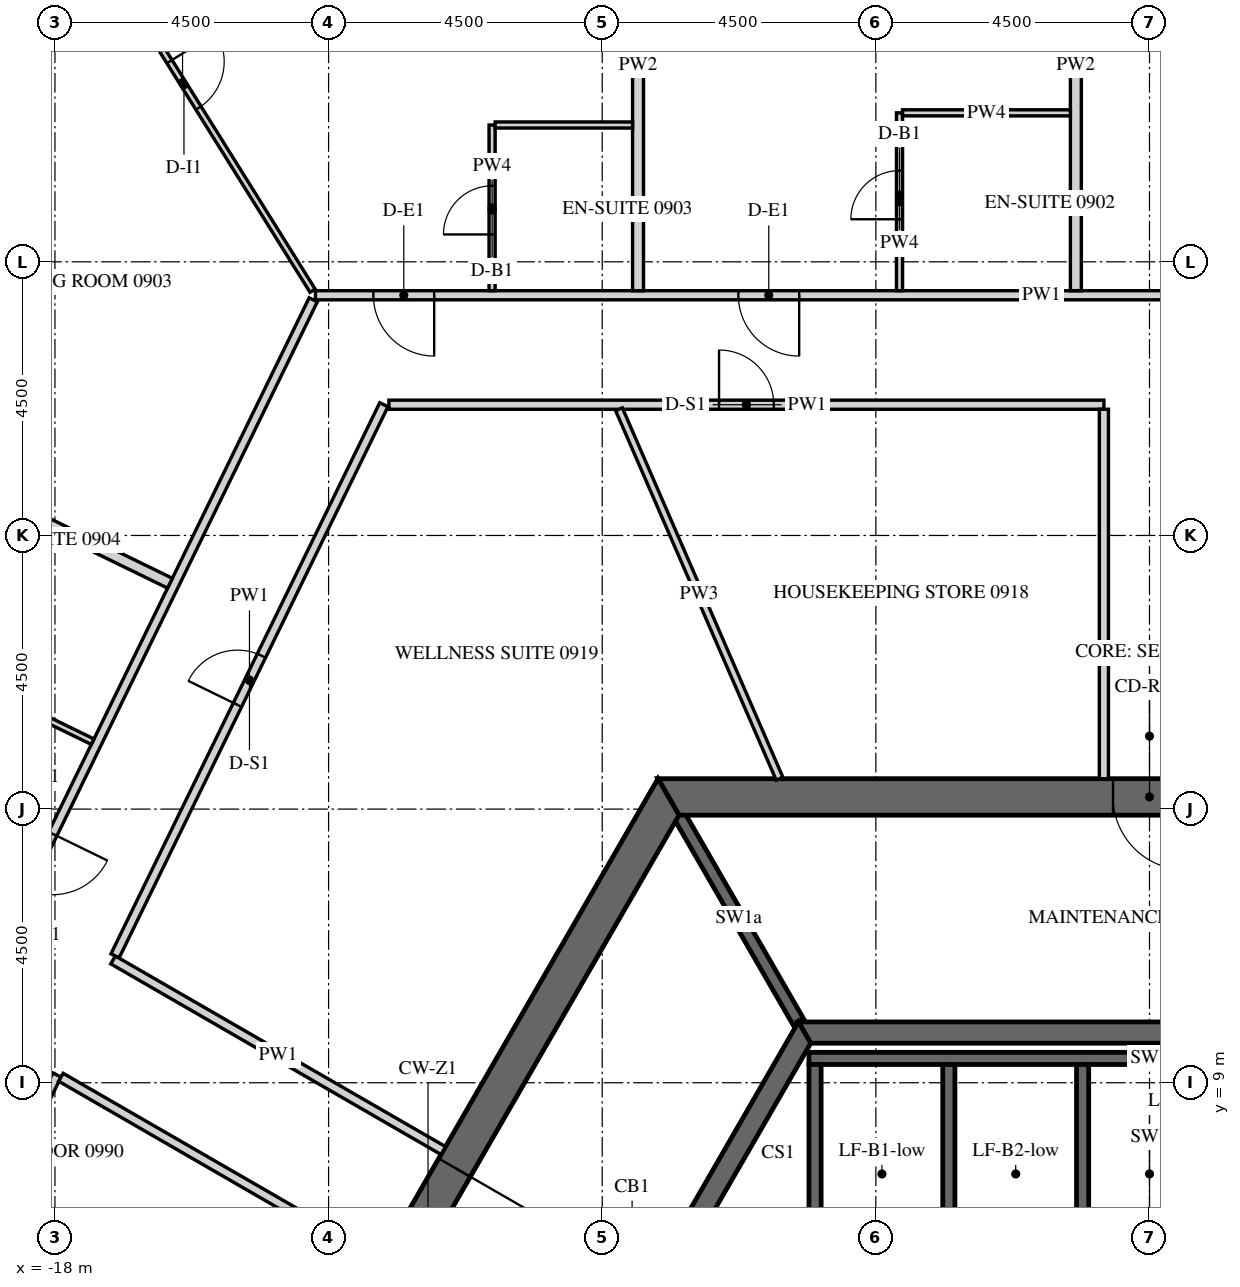
"""IFC4 building model, lengths in metres.
Left out: names, types, materials, properties, quantities, classifications, styles, units other than length and angle.
Written with IfcOpenShell. Run it as: python <this file> out.ifc"""

import sys

from ifc_helpers import new_model, si_unit, direction, frame, frame_2d, origin, place, context, subcontext, project, spatial, polyline, rectangle, outline, extrude, element, fill, save


model = new_model("IFC4")
c1 = context("Model", 3, precision=1e-05, world=origin(), true_north=direction((0.0, 1.0)))
c2 = subcontext(c1, "Body", "Model", "MODEL_VIEW")
j1 = project(units=[si_unit("LENGTHUNIT", "METRE"), si_unit("PLANEANGLEUNIT", "RADIAN")], contexts=[c1])
p1 = place(None, origin())
s1 = spatial("IfcSite", under=j1, at=p1, CompositionType="ELEMENT")
p2 = place(p1, origin())
s2 = spatial("IfcBuilding", under=s1, at=p2, CompositionType="ELEMENT")
p3 = place(p2, frame((0.0, 0.0, 123.3)))
s3 = spatial("IfcBuildingStorey", under=s2, at=p3, CompositionType="ELEMENT", Elevation=123.3)
p4 = place(p3, frame((-7.91, 13.7, -0.15), z_axis=(0.0, 0.0, 1.0), x_axis=(-0.499999880136, -0.866025472988, 0.0)))
e1 = element("IfcWall", 1, at=p4, inside=s3, PredefinedType="SHEAR", context=c2, shape_type="SweptSolid", body=[
    extrude(outline(polyline([(-0.173, -0.3), (15.993, -0.3), (15.646, 0.3), (0.173, 0.3), (-0.173, -0.3)])), origin(), (0.0, 0.0, 1.0), 3.9),
])
p5 = place(p4, frame((7.039, 0.0, 0.15)))
e2 = element("IfcOpeningElement", 2, at=p5, cuts=e1, PredefinedType="OPENING", context=c2, shape_type="SweptSolid", body=[
    extrude(rectangle(XDim=1.8, YDim=2.4, at=frame_2d((0.9, 1.2))), frame((0.0, 0.31, 0.0), z_axis=(0.0, -1.0, 0.0), x_axis=(1.0, 0.0, 0.0)), (0.0, 0.0, 1.0), 0.62),
])
p6 = place(p3, frame((7.91, 13.7, -0.15), z_axis=(0.0, 0.0, 1.0), x_axis=(-1.0, 0.0, 0.0)))
e3 = element("IfcWall", 3, at=p6, inside=s3, PredefinedType="SHEAR", context=c2, shape_type="SweptSolid", body=[
    extrude(outline(polyline([(-0.173, -0.3), (15.993, -0.3), (15.646, 0.3), (0.173, 0.3), (-0.173, -0.3)])), origin(), (0.0, 0.0, 1.0), 3.9),
])
p7 = place(p6, frame((7.31, 0.0, 0.15)))
e4 = element("IfcOpeningElement", 4, at=p7, cuts=e3, PredefinedType="OPENING", context=c2, shape_type="SweptSolid", body=[
    extrude(rectangle(XDim=1.2, YDim=2.4, at=frame_2d((0.6, 1.2))), frame((0.0, 0.31, 0.0), z_axis=(0.0, -1.0, 0.0), x_axis=(1.0, 0.0, 0.0)), (0.0, 0.0, 1.0), 0.62),
])
p8 = place(p3, frame((-5.673, 9.825, -0.15), z_axis=(0.0, 0.0, 1.0), x_axis=(-0.499995046907, -0.866028263435, 0.0)))
e5 = element("IfcWall", 5, at=p8, inside=s3, PredefinedType="SHEAR", context=c2, shape_type="SweptSolid", body=[
    extrude(outline(polyline([(-0.101, -0.175), (11.446, -0.175), (11.244, 0.175), (0.101, 0.175), (-0.101, -0.175)])), origin(), (0.0, 0.0, 1.0), 3.9),
])
p9 = place(p8, frame((4.801, 0.0, 0.15)))
e6 = element("IfcOpeningElement", 6, at=p9, cuts=e5, PredefinedType="OPENING", context=c2, shape_type="SweptSolid", body=[
    extrude(rectangle(XDim=1.8, YDim=2.4, at=frame_2d((0.9, 1.2))), frame((0.0, 0.185, 0.0), z_axis=(0.0, -1.0, 0.0), x_axis=(1.0, 0.0, 0.0)), (0.0, 0.0, 1.0), 0.37),
])
p10 = place(p3, frame((5.673, 9.825, -0.15), z_axis=(0.0, 0.0, 1.0), x_axis=(-1.0, 0.0, 0.0)))
e7 = element("IfcWall", 7, at=p10, inside=s3, PredefinedType="SHEAR", context=c2, shape_type="SweptSolid", body=[
    extrude(outline(polyline([(-0.101, -0.175), (11.446, -0.175), (11.244, 0.175), (0.101, 0.175), (-0.101, -0.175)])), origin(), (0.0, 0.0, 1.0), 3.9),
])
p11 = place(p3, frame((-5.6, 9.4, -0.25), z_axis=(0.0, 0.0, 1.0), x_axis=(1.0, 0.0, 0.0)))
e8 = element("IfcWall", 8, at=p11, inside=s3, PredefinedType="SHEAR", context=c2, shape_type="SweptSolid", body=[
    extrude(rectangle(XDim=11.2, YDim=0.2, at=frame_2d((5.6, 0.0))), origin(), (0.0, 0.0, 1.0), 3.9),
])
for number, where, z_axis, x_axis in (
    (9, (-5.5, 6.4, -0.25), (0.0, 0.0, 1.0), (0.0, 1.0, 0.0)),
    (10, (-3.3, 6.4, -0.25), (0.0, 0.0, 1.0), (0.0, 1.0, 0.0)),
    (11, (-1.1, 6.4, -0.25), (0.0, 0.0, 1.0), (0.0, 1.0, 0.0)),
):
    element("IfcWall", number, at=place(p3, frame(where, z_axis=z_axis, x_axis=x_axis)), inside=s3, PredefinedType="SHEAR", context=c2, shape_type="SweptSolid", body=[
        extrude(rectangle(XDim=2.9, YDim=0.2, at=frame_2d((1.45, 0.0))), origin(), (0.0, 0.0, 1.0), 3.9),
    ])
p12 = place(p3, frame((-5.773, 10.0, -0.15), z_axis=(0.0, 0.0, 1.0), x_axis=(-0.500038251005, 0.86600331843, 0.0)))
e12 = element("IfcWall", 12, at=p12, inside=s3, PredefinedType="SHEAR", context=c2, shape_type="SweptSolid", body=[
    extrude(rectangle(XDim=3.926, YDim=0.2, at=frame_2d((1.963, 0.0))), origin(), (0.0, 0.0, 1.0), 3.9),
])
p13 = place(p3, frame((10.161, 21.95, 0.0), z_axis=(0.0, 0.0, 1.0), x_axis=(-1.0, 0.0, 0.0)))
e13 = element("IfcWall", 13, at=p13, inside=s3, PredefinedType="PARTITIONING", context=c2, shape_type="SweptSolid", body=[
    extrude(rectangle(XDim=23.877, YDim=0.15, at=frame_2d((11.938, 0.0))), origin(), (0.0, 0.0, 1.0), 2.988),
])
p14 = place(p13, frame((6.443, 0.0, 0.0)))
e14 = element("IfcOpeningElement", 14, at=p14, cuts=e13, PredefinedType="OPENING", context=c2, shape_type="SweptSolid", body=[
    extrude(rectangle(XDim=1.0, YDim=2.1, at=frame_2d((0.5, 1.05))), frame((0.0, 0.085, 0.0), z_axis=(0.0, -1.0, 0.0), x_axis=(1.0, 0.0, 0.0)), (0.0, 0.0, 1.0), 0.17),
])
p15 = place(p13, frame((15.922, 0.0, 0.0)))
e15 = element("IfcOpeningElement", 15, at=p15, cuts=e13, PredefinedType="OPENING", context=c2, shape_type="SweptSolid", body=[
    extrude(rectangle(XDim=1.0, YDim=2.1, at=frame_2d((0.5, 1.05))), frame((0.0, 0.085, 0.0), z_axis=(0.0, -1.0, 0.0), x_axis=(1.0, 0.0, 0.0)), (0.0, 0.0, 1.0), 0.17),
])
p16 = place(p13, frame((21.925, 0.0, 0.0)))
e16 = element("IfcOpeningElement", 16, at=p16, cuts=e13, PredefinedType="OPENING", context=c2, shape_type="SweptSolid", body=[
    extrude(rectangle(XDim=1.0, YDim=2.1, at=frame_2d((0.5, 1.05))), frame((0.0, 0.085, 0.0), z_axis=(0.0, -1.0, 0.0), x_axis=(1.0, 0.0, 0.0)), (0.0, 0.0, 1.0), 0.17),
])
p17 = place(p3, frame((-13.752, 21.875, 0.0), z_axis=(0.0, 0.0, 1.0), x_axis=(-0.438374473378, -0.898792423806, 0.0)))
e17 = element("IfcWall", 17, at=p17, inside=s3, PredefinedType="PARTITIONING", context=c2, shape_type="SweptSolid", body=[
    extrude(rectangle(XDim=21.918, YDim=0.15, at=frame_2d((10.959, 0.0))), origin(), (0.0, 0.0, 1.0), 2.988),
])
p18 = place(p17, frame((9.771, 0.0, 0.0)))
e18 = element("IfcOpeningElement", 18, at=p18, cuts=e17, PredefinedType="OPENING", context=c2, shape_type="SweptSolid", body=[
    extrude(rectangle(XDim=1.0, YDim=2.1, at=frame_2d((0.5, 1.05))), frame((0.0, 0.085, 0.0), z_axis=(0.0, -1.0, 0.0), x_axis=(1.0, 0.0, 0.0)), (0.0, 0.0, 1.0), 0.17),
])
p19 = place(p17, frame((15.412, 0.0, 0.0)))
e19 = element("IfcOpeningElement", 19, at=p19, cuts=e17, PredefinedType="OPENING", context=c2, shape_type="SweptSolid", body=[
    extrude(rectangle(XDim=1.0, YDim=2.1, at=frame_2d((0.5, 1.05))), frame((0.0, 0.085, 0.0), z_axis=(0.0, -1.0, 0.0), x_axis=(1.0, 0.0, 0.0)), (0.0, 0.0, 1.0), 0.17),
])
p20 = place(p3, frame((-12.508, 20.15, 0.0), z_axis=(0.0, 0.0, 1.0), x_axis=(1.0, 0.0, 0.0)))
e20 = element("IfcWall", 20, at=p20, inside=s3, PredefinedType="PARTITIONING", context=c2, shape_type="SweptSolid", body=[
    extrude(rectangle(XDim=11.758, YDim=0.15, at=frame_2d((5.879, 0.0))), origin(), (0.0, 0.0, 1.0), 2.988),
])
p21 = place(p20, frame((5.429, 0.0, 0.0)))
e21 = element("IfcOpeningElement", 21, at=p21, cuts=e20, PredefinedType="OPENING", context=c2, shape_type="SweptSolid", body=[
    extrude(rectangle(XDim=0.9, YDim=2.1, at=frame_2d((0.45, 1.05))), frame((0.0, 0.085, 0.0), z_axis=(0.0, -1.0, 0.0), x_axis=(1.0, 0.0, 0.0)), (0.0, 0.0, 1.0), 0.17),
])
p22 = place(p3, frame((-0.75, 20.075, 0.0), z_axis=(0.0, 0.0, 1.0), x_axis=(0.0, -1.0, 0.0)))
e22 = element("IfcWall", 22, at=p22, inside=s3, PredefinedType="PARTITIONING", context=c2, shape_type="SweptSolid", body=[
    extrude(rectangle(XDim=6.075, YDim=0.15, at=frame_2d((3.038, 0.0))), origin(), (0.0, 0.0, 1.0), 2.988),
])
p23 = place(p3, frame((-11.614, 7.884, 0.0), z_axis=(0.0, 0.0, 1.0), x_axis=(-0.866025438137, 0.4999999405, 0.0)))
e23 = element("IfcWall", 23, at=p23, inside=s3, PredefinedType="PARTITIONING", context=c2, shape_type="SweptSolid", body=[
    extrude(rectangle(XDim=6.271, YDim=0.15, at=frame_2d((3.135, 0.0))), origin(), (0.0, 0.0, 1.0), 2.988),
])
p24 = place(p3, frame((-17.011, 11.087, 0.0), z_axis=(0.0, 0.0, 1.0), x_axis=(0.43836877185, 0.898795204631, 0.0)))
e24 = element("IfcWall", 24, at=p24, inside=s3, PredefinedType="PARTITIONING", context=c2, shape_type="SweptSolid", body=[
    extrude(rectangle(XDim=10.083, YDim=0.15, at=frame_2d((5.042, 0.0))), origin(), (0.0, 0.0, 1.0), 2.988),
])
p25 = place(p24, frame((4.592, 0.0, 0.0)))
e25 = element("IfcOpeningElement", 25, at=p25, cuts=e24, PredefinedType="OPENING", context=c2, shape_type="SweptSolid", body=[
    extrude(rectangle(XDim=0.9, YDim=2.1, at=frame_2d((0.45, 1.05))), frame((0.0, 0.085, 0.0), z_axis=(0.0, -1.0, 0.0), x_axis=(1.0, 0.0, 0.0)), (0.0, 0.0, 1.0), 0.17),
])
p26 = place(p3, frame((-22.219, 0.41, 0.0), z_axis=(0.0, 0.0, 1.0), x_axis=(0.438391891827, 0.898783927972, 0.0)))
e26 = element("IfcWall", 26, at=p26, inside=s3, PredefinedType="PARTITIONING", context=c2, shape_type="SweptSolid", body=[
    extrude(rectangle(XDim=9.699, YDim=0.15, at=frame_2d((4.85, 0.0))), origin(), (0.0, 0.0, 1.0), 2.988),
])
p27 = place(p26, frame((4.4, 0.0, 0.0)))
e27 = element("IfcOpeningElement", 27, at=p27, cuts=e26, PredefinedType="OPENING", context=c2, shape_type="SweptSolid", body=[
    extrude(rectangle(XDim=0.9, YDim=2.1, at=frame_2d((0.45, 1.05))), frame((0.0, 0.085, 0.0), z_axis=(0.0, -1.0, 0.0), x_axis=(1.0, 0.0, 0.0)), (0.0, 0.0, 1.0), 0.17),
])
p28 = place(p3, frame((-17.902, 9.09, 0.0), z_axis=(0.0, 0.0, 1.0), x_axis=(0.866036368755, -0.499981007633, 0.0)))
e28 = element("IfcWall", 28, at=p28, inside=s3, PredefinedType="PARTITIONING", context=c2, shape_type="SweptSolid", body=[
    extrude(rectangle(XDim=6.049, YDim=0.15, at=frame_2d((3.024, 0.0))), origin(), (0.0, 0.0, 1.0), 2.988),
])
p29 = place(p3, frame((-1.211, 29.45, 0.0), z_axis=(0.0, 0.0, 1.0), x_axis=(0.0, -1.0, 0.0)))
e29 = element("IfcWall", 29, at=p29, inside=s3, PredefinedType="PARTITIONING", context=c2, shape_type="SweptSolid", body=[
    extrude(rectangle(XDim=7.425, YDim=0.18, at=frame_2d((3.712, 0.0))), origin(), (0.0, 0.0, 1.0), 2.988),
])
p30 = place(p3, frame((-4.111, 22.025, 0.0), z_axis=(0.0, 0.0, 1.0), x_axis=(0.0, 1.0, 0.0)))
e30 = element("IfcWall", 30, at=p30, inside=s3, PredefinedType="PARTITIONING", context=c2, shape_type="SweptSolid", body=[
    extrude(rectangle(XDim=2.925, YDim=0.1, at=frame_2d((1.462, 0.0))), origin(), (0.0, 0.0, 1.0), 2.988),
])
p31 = place(p30, frame((1.175, 0.0, 0.0)))
e31 = element("IfcOpeningElement", 31, at=p31, cuts=e30, PredefinedType="OPENING", context=c2, shape_type="SweptSolid", body=[
    extrude(rectangle(XDim=0.8, YDim=2.1, at=frame_2d((0.4, 1.05))), frame((0.0, 0.06, 0.0), z_axis=(0.0, -1.0, 0.0), x_axis=(1.0, 0.0, 0.0)), (0.0, 0.0, 1.0), 0.12),
])
p32 = place(p3, frame((-4.061, 24.95, 0.0), z_axis=(0.0, 0.0, 1.0), x_axis=(1.0, 0.0, 0.0)))
e32 = element("IfcWall", 32, at=p32, inside=s3, PredefinedType="PARTITIONING", context=c2, shape_type="SweptSolid", body=[
    extrude(rectangle(XDim=2.76, YDim=0.1, at=frame_2d((1.38, 0.0))), origin(), (0.0, 0.0, 1.0), 2.988),
])
p33 = place(p3, frame((-8.411, 29.45, 0.0), z_axis=(0.0, 0.0, 1.0), x_axis=(0.0, -1.0, 0.0)))
e33 = element("IfcWall", 33, at=p33, inside=s3, PredefinedType="PARTITIONING", context=c2, shape_type="SweptSolid", body=[
    extrude(rectangle(XDim=7.425, YDim=0.18, at=frame_2d((3.712, 0.0))), origin(), (0.0, 0.0, 1.0), 2.988),
])
p34 = place(p3, frame((-10.811, 22.025, 0.0), z_axis=(0.0, 0.0, 1.0), x_axis=(0.0, 1.0, 0.0)))
e34 = element("IfcWall", 34, at=p34, inside=s3, PredefinedType="PARTITIONING", context=c2, shape_type="SweptSolid", body=[
    extrude(rectangle(XDim=2.725, YDim=0.1, at=frame_2d((1.363, 0.0))), origin(), (0.0, 0.0, 1.0), 2.988),
])
p35 = place(p34, frame((0.925, 0.0, 0.0)))
e35 = element("IfcOpeningElement", 35, at=p35, cuts=e34, PredefinedType="OPENING", context=c2, shape_type="SweptSolid", body=[
    extrude(rectangle(XDim=0.8, YDim=2.1, at=frame_2d((0.4, 1.05))), frame((0.0, 0.06, 0.0), z_axis=(0.0, -1.0, 0.0), x_axis=(1.0, 0.0, 0.0)), (0.0, 0.0, 1.0), 0.12),
])
p36 = place(p3, frame((-10.761, 24.75, 0.0), z_axis=(0.0, 0.0, 1.0), x_axis=(1.0, 0.0, 0.0)))
e36 = element("IfcWall", 36, at=p36, inside=s3, PredefinedType="PARTITIONING", context=c2, shape_type="SweptSolid", body=[
    extrude(rectangle(XDim=2.26, YDim=0.1, at=frame_2d((1.13, 0.0))), origin(), (0.0, 0.0, 1.0), 2.988),
])
p37 = place(p3, frame((-18.041, 28.871, 0.0), z_axis=(0.0, 0.0, 1.0), x_axis=(0.529928260537, -0.848042474575, 0.0)))
e37 = element("IfcWall", 37, at=p37, inside=s3, PredefinedType="PARTITIONING", context=c2, shape_type="SweptSolid", body=[
    extrude(rectangle(XDim=8.073, YDim=0.1, at=frame_2d((4.037, 0.0))), origin(), (0.0, 0.0, 1.0), 2.988),
])
p38 = place(p37, frame((3.631, 0.0, 0.0)))
e38 = element("IfcOpeningElement", 38, at=p38, cuts=e37, PredefinedType="OPENING", context=c2, shape_type="SweptSolid", body=[
    extrude(rectangle(XDim=0.9, YDim=2.1, at=frame_2d((0.45, 1.05))), frame((0.0, 0.06, 0.0), z_axis=(0.0, -1.0, 0.0), x_axis=(1.0, 0.0, 0.0)), (0.0, 0.0, 1.0), 0.12),
])
p39 = place(p3, frame((-22.782, 20.47, 0.0), z_axis=(0.0, 0.0, 1.0), x_axis=(0.898796252669, -0.438366623032, 0.0)))
e39 = element("IfcWall", 39, at=p39, inside=s3, PredefinedType="PARTITIONING", context=c2, shape_type="SweptSolid", body=[
    extrude(rectangle(XDim=7.425, YDim=0.18, at=frame_2d((3.712, 0.0))), origin(), (0.0, 0.0, 1.0), 2.988),
])
p40 = place(p3, frame((-17.38, 14.608, 0.0), z_axis=(0.0, 0.0, 1.0), x_axis=(-0.898790906006, 0.438377585285, 0.0)))
e40 = element("IfcWall", 40, at=p40, inside=s3, PredefinedType="PARTITIONING", context=c2, shape_type="SweptSolid", body=[
    extrude(rectangle(XDim=2.925, YDim=0.1, at=frame_2d((1.462, 0.0))), origin(), (0.0, 0.0, 1.0), 2.988),
])
p41 = place(p40, frame((1.175, 0.0, 0.0)))
e41 = element("IfcOpeningElement", 41, at=p41, cuts=e40, PredefinedType="OPENING", context=c2, shape_type="SweptSolid", body=[
    extrude(rectangle(XDim=0.8, YDim=2.1, at=frame_2d((0.4, 1.05))), frame((0.0, 0.06, 0.0), z_axis=(0.0, -1.0, 0.0), x_axis=(1.0, 0.0, 0.0)), (0.0, 0.0, 1.0), 0.12),
])
p42 = place(p3, frame((-8.724, 20.075, 0.0), z_axis=(0.0, 0.0, 1.0), x_axis=(0.398549547162, -0.917146803111, 0.0)))
e42 = element("IfcWall", 42, at=p42, inside=s3, PredefinedType="PARTITIONING", context=c2, shape_type="SweptSolid", body=[
    extrude(rectangle(XDim=6.624, YDim=0.12, at=frame_2d((3.312, 0.0))), origin(), (0.0, 0.0, 1.0), 2.988),
])
p43 = place(p5, origin())
e43 = element("IfcDoor", 43, at=p43, inside=s3, OperationType="DOUBLE_DOOR_SINGLE_SWING", PredefinedType="DOOR", context=c2, shape_type="SweptSolid", body=[
    extrude(rectangle(XDim=1.8, YDim=2.4, at=frame_2d((0.9, 1.2))), frame((0.0, 0.025, 0.0), z_axis=(0.0, -1.0, 0.0), x_axis=(1.0, 0.0, 0.0)), (0.0, 0.0, 1.0), 0.05),
])
fill(e2, e43)
p44 = place(p7, origin())
e44 = element("IfcDoor", 44, at=p44, inside=s3, OperationType="SINGLE_SWING_LEFT", PredefinedType="DOOR", context=c2, shape_type="SweptSolid", body=[
    extrude(rectangle(XDim=1.2, YDim=2.4, at=frame_2d((0.6, 1.2))), frame((0.0, 0.025, 0.0), z_axis=(0.0, -1.0, 0.0), x_axis=(1.0, 0.0, 0.0)), (0.0, 0.0, 1.0), 0.05),
])
fill(e4, e44)
p45 = place(p15, origin())
e45 = element("IfcDoor", 45, at=p45, inside=s3, OperationType="SINGLE_SWING_LEFT", PredefinedType="DOOR", context=c2, shape_type="SweptSolid", body=[
    extrude(rectangle(XDim=1.0, YDim=2.1, at=frame_2d((0.5, 1.05))), frame((0.0, 0.025, 0.0), z_axis=(0.0, -1.0, 0.0), x_axis=(1.0, 0.0, 0.0)), (0.0, 0.0, 1.0), 0.05),
])
fill(e15, e45)
p46 = place(p31, origin())
e46 = element("IfcDoor", 46, at=p46, inside=s3, OperationType="SINGLE_SWING_LEFT", PredefinedType="DOOR", context=c2, shape_type="SweptSolid", body=[
    extrude(rectangle(XDim=0.8, YDim=2.1, at=frame_2d((0.4, 1.05))), frame((0.0, 0.025, 0.0), z_axis=(0.0, -1.0, 0.0), x_axis=(1.0, 0.0, 0.0)), (0.0, 0.0, 1.0), 0.05),
])
fill(e31, e46)
p47 = place(p16, origin())
e47 = element("IfcDoor", 47, at=p47, inside=s3, OperationType="SINGLE_SWING_LEFT", PredefinedType="DOOR", context=c2, shape_type="SweptSolid", body=[
    extrude(rectangle(XDim=1.0, YDim=2.1, at=frame_2d((0.5, 1.05))), frame((0.0, 0.025, 0.0), z_axis=(0.0, -1.0, 0.0), x_axis=(1.0, 0.0, 0.0)), (0.0, 0.0, 1.0), 0.05),
])
fill(e16, e47)
p48 = place(p35, origin())
e48 = element("IfcDoor", 48, at=p48, inside=s3, OperationType="SINGLE_SWING_RIGHT", PredefinedType="DOOR", context=c2, shape_type="SweptSolid", body=[
    extrude(rectangle(XDim=0.8, YDim=2.1, at=frame_2d((0.4, 1.05))), frame((0.0, 0.025, 0.0), z_axis=(0.0, -1.0, 0.0), x_axis=(1.0, 0.0, 0.0)), (0.0, 0.0, 1.0), 0.05),
])
fill(e35, e48)
p49 = place(p38, origin())
e49 = element("IfcDoor", 49, at=p49, inside=s3, OperationType="SINGLE_SWING_LEFT", PredefinedType="DOOR", context=c2, shape_type="SweptSolid", body=[
    extrude(rectangle(XDim=0.9, YDim=2.1, at=frame_2d((0.45, 1.05))), frame((0.0, 0.025, 0.0), z_axis=(0.0, -1.0, 0.0), x_axis=(1.0, 0.0, 0.0)), (0.0, 0.0, 1.0), 0.05),
])
fill(e38, e49)
p50 = place(p18, origin())
e50 = element("IfcDoor", 50, at=p50, inside=s3, OperationType="SINGLE_SWING_RIGHT", PredefinedType="DOOR", context=c2, shape_type="SweptSolid", body=[
    extrude(rectangle(XDim=1.0, YDim=2.1, at=frame_2d((0.5, 1.05))), frame((0.0, 0.025, 0.0), z_axis=(0.0, -1.0, 0.0), x_axis=(1.0, 0.0, 0.0)), (0.0, 0.0, 1.0), 0.05),
])
fill(e18, e50)
p51 = place(p21, origin())
e51 = element("IfcDoor", 51, at=p51, inside=s3, OperationType="SINGLE_SWING_RIGHT", PredefinedType="DOOR", context=c2, shape_type="SweptSolid", body=[
    extrude(rectangle(XDim=0.9, YDim=2.1, at=frame_2d((0.45, 1.05))), frame((0.0, 0.025, 0.0), z_axis=(0.0, -1.0, 0.0), x_axis=(1.0, 0.0, 0.0)), (0.0, 0.0, 1.0), 0.05),
])
fill(e21, e51)
p52 = place(p25, origin())
e52 = element("IfcDoor", 52, at=p52, inside=s3, OperationType="SINGLE_SWING_LEFT", PredefinedType="DOOR", context=c2, shape_type="SweptSolid", body=[
    extrude(rectangle(XDim=0.9, YDim=2.1, at=frame_2d((0.45, 1.05))), frame((0.0, 0.025, 0.0), z_axis=(0.0, -1.0, 0.0), x_axis=(1.0, 0.0, 0.0)), (0.0, 0.0, 1.0), 0.05),
])
fill(e25, e52)
save(model, sys.argv[1])
